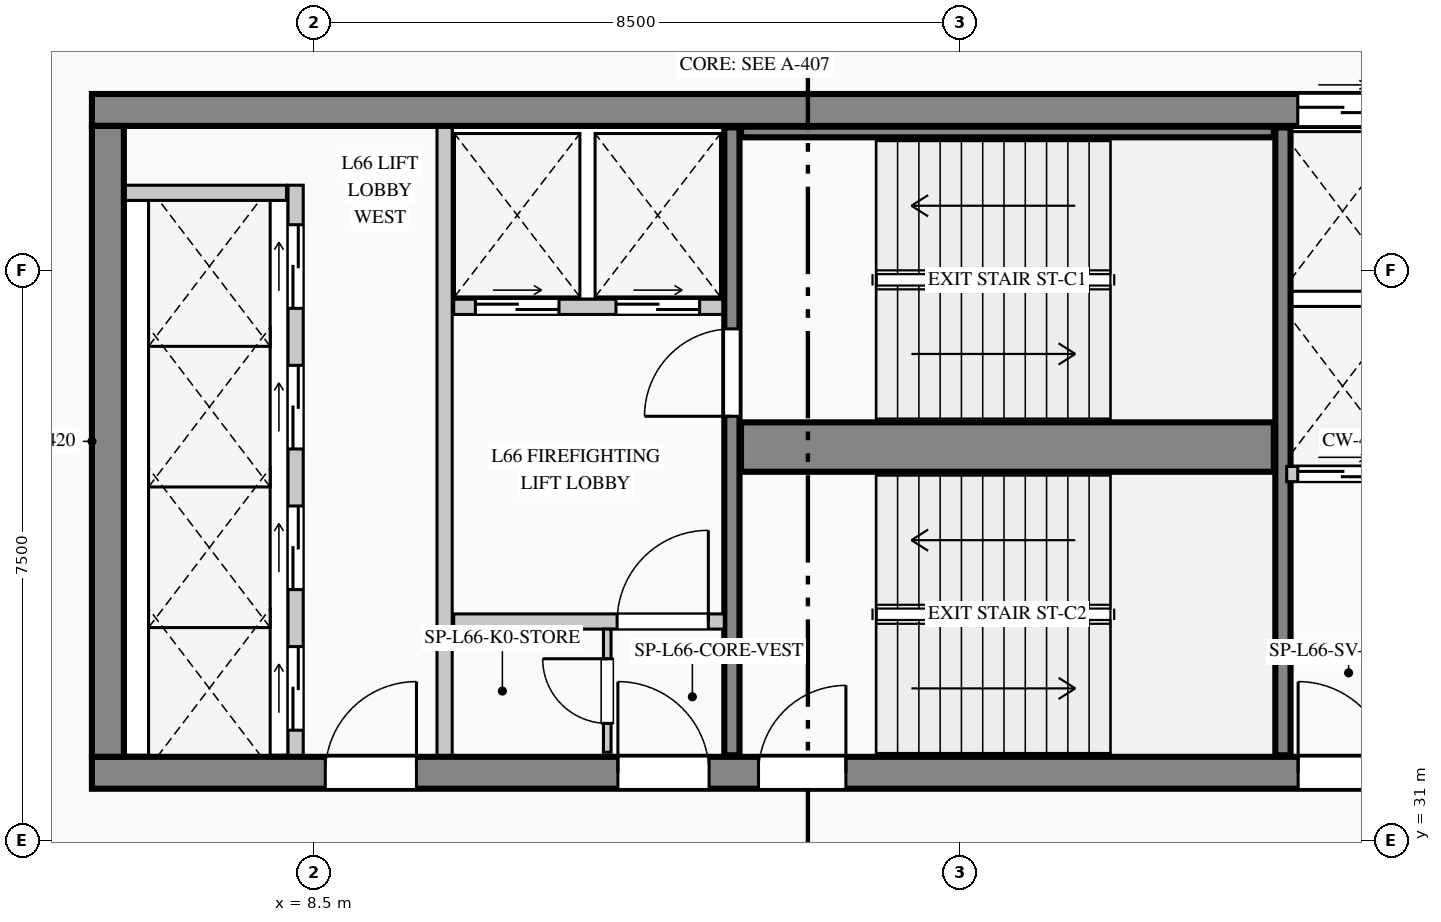
"""IFC4 building model, lengths in metres.
Left out: names, types, materials, properties, quantities, classifications, styles, units other than length and angle.
Written with IfcOpenShell. Run it as: python <this file> out.ifc"""

import sys

from ifc_helpers import new_model, si_unit, direction, frame, frame_2d, origin, place, context, subcontext, project, spatial, rectangle, extrude, element, fill, save


model = new_model("IFC4")
c1 = context("Model", 3, precision=1e-05, world=origin(), true_north=direction((0.0, 1.0)))
c2 = subcontext(c1, "Body", "Model", "MODEL_VIEW")
j1 = project(units=[si_unit("LENGTHUNIT", "METRE"), si_unit("PLANEANGLEUNIT", "RADIAN")], contexts=[c1])
p1 = place(None, origin())
s1 = spatial("IfcSite", under=j1, at=p1, CompositionType="ELEMENT")
p2 = place(p1, origin())
s2 = spatial("IfcBuilding", under=s1, at=p2, CompositionType="ELEMENT")
p3 = place(p2, frame((0.0, 0.0, 276.45)))
s3 = spatial("IfcBuildingStorey", under=s2, at=p3, CompositionType="ELEMENT", Elevation=276.45)
p4 = place(p3, frame((5.58, 40.61, 0.0), z_axis=(0.0, 0.0, 1.0), x_axis=(1.0, 0.0, 0.0)))
e1 = element("IfcWall", 1, at=p4, inside=s3, PredefinedType="SHEAR", context=c2, shape_type="SweptSolid", body=[
    extrude(rectangle(XDim=17.69, YDim=0.42, at=frame_2d((8.845, 0.0))), origin(), (0.0, 0.0, 1.0), 3.95),
])
p5 = place(p4, frame((15.865, 0.0, 0.0)))
e2 = element("IfcOpeningElement", 2, at=p5, cuts=e1, PredefinedType="OPENING", context=c2, shape_type="SweptSolid", body=[
    extrude(rectangle(XDim=1.18, YDim=2.25, at=frame_2d((0.59, 1.125))), frame((0.0, 0.22, 0.0), z_axis=(0.0, -1.0, 0.0), x_axis=(1.0, 0.0, 0.0)), (0.0, 0.0, 1.0), 0.44),
])
p6 = place(p3, frame((5.58, 31.89, 0.0), z_axis=(0.0, 0.0, 1.0), x_axis=(1.0, 0.0, 0.0)))
e3 = element("IfcWall", 3, at=p6, inside=s3, PredefinedType="SHEAR", context=c2, shape_type="SweptSolid", body=[
    extrude(rectangle(XDim=17.69, YDim=0.42, at=frame_2d((8.845, 0.0))), origin(), (0.0, 0.0, 1.0), 3.95),
])
p7 = place(p6, frame((3.07, 0.0, 0.0)))
e4 = element("IfcOpeningElement", 4, at=p7, cuts=e3, PredefinedType="OPENING", context=c2, shape_type="SweptSolid", body=[
    extrude(rectangle(XDim=1.2, YDim=2.2, at=frame_2d((0.6, 1.1))), frame((0.0, 0.22, 0.0), z_axis=(0.0, -1.0, 0.0), x_axis=(1.0, 0.0, 0.0)), (0.0, 0.0, 1.0), 0.44),
])
p8 = place(p6, frame((6.92, 0.0, 0.0)))
e5 = element("IfcOpeningElement", 5, at=p8, cuts=e3, PredefinedType="OPENING", context=c2, shape_type="SweptSolid", body=[
    extrude(rectangle(XDim=1.2, YDim=2.2, at=frame_2d((0.6, 1.1))), frame((0.0, 0.22, 0.0), z_axis=(0.0, -1.0, 0.0), x_axis=(1.0, 0.0, 0.0)), (0.0, 0.0, 1.0), 0.44),
])
p9 = place(p6, frame((8.77, 0.0, 0.0)))
e6 = element("IfcOpeningElement", 6, at=p9, cuts=e3, PredefinedType="OPENING", context=c2, shape_type="SweptSolid", body=[
    extrude(rectangle(XDim=1.15, YDim=2.2, at=frame_2d((0.575, 1.1))), frame((0.0, 0.22, 0.0), z_axis=(0.0, -1.0, 0.0), x_axis=(1.0, 0.0, 0.0)), (0.0, 0.0, 1.0), 0.44),
])
p10 = place(p6, frame((15.87, 0.0, 0.0)))
e7 = element("IfcOpeningElement", 7, at=p10, cuts=e3, PredefinedType="OPENING", context=c2, shape_type="SweptSolid", body=[
    extrude(rectangle(XDim=1.2, YDim=2.2, at=frame_2d((0.6, 1.1))), frame((0.0, 0.22, 0.0), z_axis=(0.0, -1.0, 0.0), x_axis=(1.0, 0.0, 0.0)), (0.0, 0.0, 1.0), 0.44),
])
p11 = place(p3, frame((5.79, 32.1, 0.0), z_axis=(0.0, 0.0, 1.0), x_axis=(0.0, 1.0, 0.0)))
e8 = element("IfcWall", 8, at=p11, inside=s3, PredefinedType="SHEAR", context=c2, shape_type="SweptSolid", body=[
    extrude(rectangle(XDim=8.3, YDim=0.42, at=frame_2d((4.15, 0.0))), origin(), (0.0, 0.0, 1.0), 3.95),
])
p12 = place(p3, frame((14.0, 32.12, 0.0), z_axis=(0.0, 0.0, 1.0), x_axis=(0.0, 1.0, 0.0)))
e9 = element("IfcWall", 9, at=p12, inside=s3, PredefinedType="SHEAR", context=c2, shape_type="SweptSolid", body=[
    extrude(rectangle(XDim=8.26, YDim=0.2, at=frame_2d((4.13, 0.0))), origin(), (0.0, 0.0, 1.0), 3.95),
])
p13 = place(p12, frame((4.46, 0.0, 0.0)))
e10 = element("IfcOpeningElement", 10, at=p13, cuts=e9, PredefinedType="OPENING", context=c2, shape_type="SweptSolid", body=[
    extrude(rectangle(XDim=1.15, YDim=2.2, at=frame_2d((0.575, 1.1))), frame((0.0, 0.11, 0.0), z_axis=(0.0, -1.0, 0.0), x_axis=(1.0, 0.0, 0.0)), (0.0, 0.0, 1.0), 0.22),
])
p14 = place(p3, frame((14.12, 36.175, 0.0), z_axis=(0.0, 0.0, 1.0), x_axis=(1.0, 0.0, 0.0)))
e11 = element("IfcWall", 11, at=p14, inside=s3, PredefinedType="SHEAR", context=c2, shape_type="SweptSolid", body=[
    extrude(rectangle(XDim=7.01, YDim=0.65, at=frame_2d((3.505, 0.0))), origin(), (0.0, 0.0, 1.0), 3.95),
])
p15 = place(p3, frame((21.25, 32.12, 0.0), z_axis=(0.0, 0.0, 1.0), x_axis=(0.0, 1.0, 0.0)))
e12 = element("IfcWall", 12, at=p15, inside=s3, PredefinedType="SHEAR", context=c2, shape_type="SweptSolid", body=[
    extrude(rectangle(XDim=8.26, YDim=0.2, at=frame_2d((4.13, 0.0))), origin(), (0.0, 0.0, 1.0), 3.95),
])
p16 = place(p3, frame((14.12, 40.32, 0.0), z_axis=(0.0, 0.0, 1.0), x_axis=(1.0, 0.0, 0.0)))
e13 = element("IfcWall", 13, at=p16, inside=s3, PredefinedType="SHEAR", context=c2, shape_type="SweptSolid", body=[
    extrude(rectangle(XDim=7.01, YDim=0.14, at=frame_2d((3.505, 0.0))), origin(), (0.0, 0.0, 1.0), 3.95),
])
p17 = place(p3, frame((5.6, 4.32, 0.0), z_axis=(0.0, 0.0, 1.0), x_axis=(-0.075839920993, 0.997120006009, 0.0)))
e14 = element("IfcWall", 14, at=p17, inside=s3, PredefinedType="STANDARD", context=c2, shape_type="SweptSolid", body=[
    extrude(rectangle(XDim=37.468, YDim=0.24, at=frame_2d((18.734, 0.0))), origin(), (0.0, 0.0, 1.0), 3.7),
])
p18 = place(p17, frame((12.663, 0.0, 0.9)))
e15 = element("IfcOpeningElement", 15, at=p18, cuts=e14, PredefinedType="OPENING", context=c2, shape_type="SweptSolid", body=[
    extrude(rectangle(XDim=1.65, YDim=1.95, at=frame_2d((0.825, 0.975))), frame((0.0, 0.13, 0.0), z_axis=(0.0, -1.0, 0.0), x_axis=(1.0, 0.0, 0.0)), (0.0, 0.0, 1.0), 0.26),
])
p19 = place(p3, frame((8.26, 32.12, 0.0), z_axis=(0.0, 0.0, 1.0), x_axis=(0.0, 1.0, 0.0)))
e16 = element("IfcWall", 16, at=p19, inside=s3, PredefinedType="PARTITIONING", context=c2, shape_type="SweptSolid", body=[
    extrude(rectangle(XDim=7.5, YDim=0.2, at=frame_2d((3.75, 0.0))), origin(), (0.0, 0.0, 1.0), 3.7),
])
p20 = place(p19, frame((0.33, 0.0, 0.0)))
e17 = element("IfcOpeningElement", 17, at=p20, cuts=e16, PredefinedType="OPENING", context=c2, shape_type="SweptSolid", body=[
    extrude(rectangle(XDim=1.1, YDim=2.2, at=frame_2d((0.55, 1.1))), frame((0.0, 0.11, 0.0), z_axis=(0.0, -1.0, 0.0), x_axis=(1.0, 0.0, 0.0)), (0.0, 0.0, 1.0), 0.22),
])
p21 = place(p19, frame((2.18, 0.0, 0.0)))
e18 = element("IfcOpeningElement", 18, at=p21, cuts=e16, PredefinedType="OPENING", context=c2, shape_type="SweptSolid", body=[
    extrude(rectangle(XDim=1.1, YDim=2.2, at=frame_2d((0.55, 1.1))), frame((0.0, 0.11, 0.0), z_axis=(0.0, -1.0, 0.0), x_axis=(1.0, 0.0, 0.0)), (0.0, 0.0, 1.0), 0.22),
])
p22 = place(p19, frame((4.03, 0.0, 0.0)))
e19 = element("IfcOpeningElement", 19, at=p22, cuts=e16, PredefinedType="OPENING", context=c2, shape_type="SweptSolid", body=[
    extrude(rectangle(XDim=1.1, YDim=2.2, at=frame_2d((0.55, 1.1))), frame((0.0, 0.11, 0.0), z_axis=(0.0, -1.0, 0.0), x_axis=(1.0, 0.0, 0.0)), (0.0, 0.0, 1.0), 0.22),
])
p23 = place(p19, frame((5.88, 0.0, 0.0)))
e20 = element("IfcOpeningElement", 20, at=p23, cuts=e16, PredefinedType="OPENING", context=c2, shape_type="SweptSolid", body=[
    extrude(rectangle(XDim=1.1, YDim=2.2, at=frame_2d((0.55, 1.1))), frame((0.0, 0.11, 0.0), z_axis=(0.0, -1.0, 0.0), x_axis=(1.0, 0.0, 0.0)), (0.0, 0.0, 1.0), 0.22),
])
p24 = place(p3, frame((6.02, 39.52, 0.0), z_axis=(0.0, 0.0, 1.0), x_axis=(1.0, 0.0, 0.0)))
e21 = element("IfcWall", 21, at=p24, inside=s3, PredefinedType="PARTITIONING", context=c2, shape_type="SweptSolid", body=[
    extrude(rectangle(XDim=2.12, YDim=0.2, at=frame_2d((1.06, 0.0))), origin(), (0.0, 0.0, 1.0), 3.7),
])
p25 = place(p3, frame((10.22, 32.12, 0.0), z_axis=(0.0, 0.0, 1.0), x_axis=(0.0, 1.0, 0.0)))
e22 = element("IfcWall", 22, at=p25, inside=s3, PredefinedType="PARTITIONING", context=c2, shape_type="SweptSolid", body=[
    extrude(rectangle(XDim=8.26, YDim=0.2, at=frame_2d((4.13, 0.0))), origin(), (0.0, 0.0, 1.0), 3.7),
])
p26 = place(p3, frame((10.34, 38.02, 0.0), z_axis=(0.0, 0.0, 1.0), x_axis=(1.0, 0.0, 0.0)))
e23 = element("IfcWall", 23, at=p26, inside=s3, PredefinedType="PARTITIONING", context=c2, shape_type="SweptSolid", body=[
    extrude(rectangle(XDim=3.54, YDim=0.2, at=frame_2d((1.77, 0.0))), origin(), (0.0, 0.0, 1.0), 3.7),
])
p27 = place(p26, frame((0.285, 0.0, 0.0)))
e24 = element("IfcOpeningElement", 24, at=p27, cuts=e23, PredefinedType="OPENING", context=c2, shape_type="SweptSolid", body=[
    extrude(rectangle(XDim=1.1, YDim=2.2, at=frame_2d((0.55, 1.1))), frame((0.0, 0.11, 0.0), z_axis=(0.0, -1.0, 0.0), x_axis=(1.0, 0.0, 0.0)), (0.0, 0.0, 1.0), 0.22),
])
p28 = place(p26, frame((2.135, 0.0, 0.0)))
e25 = element("IfcOpeningElement", 25, at=p28, cuts=e23, PredefinedType="OPENING", context=c2, shape_type="SweptSolid", body=[
    extrude(rectangle(XDim=1.1, YDim=2.2, at=frame_2d((0.55, 1.1))), frame((0.0, 0.11, 0.0), z_axis=(0.0, -1.0, 0.0), x_axis=(1.0, 0.0, 0.0)), (0.0, 0.0, 1.0), 0.22),
])
p29 = place(p3, frame((10.34, 33.88, 0.0), z_axis=(0.0, 0.0, 1.0), x_axis=(1.0, 0.0, 0.0)))
e26 = element("IfcWall", 26, at=p29, inside=s3, PredefinedType="PARTITIONING", context=c2, shape_type="SweptSolid", body=[
    extrude(rectangle(XDim=3.56, YDim=0.2, at=frame_2d((1.78, 0.0))), origin(), (0.0, 0.0, 1.0), 3.7),
])
p30 = place(p29, frame((2.15, 0.0, 0.0)))
e27 = element("IfcOpeningElement", 27, at=p30, cuts=e26, PredefinedType="OPENING", context=c2, shape_type="SweptSolid", body=[
    extrude(rectangle(XDim=1.2, YDim=2.2, at=frame_2d((0.6, 1.1))), frame((0.0, 0.11, 0.0), z_axis=(0.0, -1.0, 0.0), x_axis=(1.0, 0.0, 0.0)), (0.0, 0.0, 1.0), 0.22),
])
p31 = place(p3, frame((12.36, 32.16, 0.0), z_axis=(0.0, 0.0, 1.0), x_axis=(0.0, 1.0, 0.0)))
e28 = element("IfcWall", 28, at=p31, inside=s3, PredefinedType="PARTITIONING", context=c2, shape_type="SweptSolid", body=[
    extrude(rectangle(XDim=1.62, YDim=0.1, at=frame_2d((0.81, 0.0))), origin(), (0.0, 0.0, 1.0), 3.7),
])
p32 = place(p31, frame((0.38, 0.0, 0.0)))
e29 = element("IfcOpeningElement", 29, at=p32, cuts=e28, PredefinedType="OPENING", context=c2, shape_type="SweptSolid", body=[
    extrude(rectangle(XDim=0.85, YDim=2.1, at=frame_2d((0.425, 1.05))), frame((0.0, 0.06, 0.0), z_axis=(0.0, -1.0, 0.0), x_axis=(1.0, 0.0, 0.0)), (0.0, 0.0, 1.0), 0.12),
])
p33 = place(p3, frame((21.3, 35.82, 0.0), z_axis=(0.0, 0.0, 1.0), x_axis=(1.0, 0.0, 0.0)))
e30 = element("IfcWall", 30, at=p33, inside=s3, PredefinedType="PARTITIONING", context=c2, shape_type="SweptSolid", body=[
    extrude(rectangle(XDim=1.5, YDim=0.2, at=frame_2d((0.75, 0.0))), origin(), (0.0, 0.0, 1.0), 3.7),
])
p34 = place(p33, frame((0.145, 0.0, 0.0)))
e31 = element("IfcOpeningElement", 31, at=p34, cuts=e30, PredefinedType="OPENING", context=c2, shape_type="SweptSolid", body=[
    extrude(rectangle(XDim=1.18, YDim=2.25, at=frame_2d((0.59, 1.125))), frame((0.0, 0.11, 0.0), z_axis=(0.0, -1.0, 0.0), x_axis=(1.0, 0.0, 0.0)), (0.0, 0.0, 1.0), 0.22),
])
p35 = place(p7, origin())
e32 = element("IfcDoor", 32, at=p35, inside=s3, OperationType="SINGLE_SWING_RIGHT", PredefinedType="DOOR", context=c2, shape_type="SweptSolid", body=[
    extrude(rectangle(XDim=1.2, YDim=2.2, at=frame_2d((0.6, 1.1))), frame((0.0, 0.025, 0.0), z_axis=(0.0, -1.0, 0.0), x_axis=(1.0, 0.0, 0.0)), (0.0, 0.0, 1.0), 0.05),
])
fill(e4, e32)
p36 = place(p8, origin())
e33 = element("IfcDoor", 33, at=p36, inside=s3, OperationType="SINGLE_SWING_LEFT", PredefinedType="DOOR", context=c2, shape_type="SweptSolid", body=[
    extrude(rectangle(XDim=1.2, YDim=2.2, at=frame_2d((0.6, 1.1))), frame((0.0, 0.025, 0.0), z_axis=(0.0, -1.0, 0.0), x_axis=(1.0, 0.0, 0.0)), (0.0, 0.0, 1.0), 0.05),
])
fill(e5, e33)
p37 = place(p9, origin())
e34 = element("IfcDoor", 34, at=p37, inside=s3, OperationType="SINGLE_SWING_RIGHT", PredefinedType="DOOR", context=c2, shape_type="SweptSolid", body=[
    extrude(rectangle(XDim=1.15, YDim=2.2, at=frame_2d((0.575, 1.1))), frame((0.0, 0.025, 0.0), z_axis=(0.0, -1.0, 0.0), x_axis=(1.0, 0.0, 0.0)), (0.0, 0.0, 1.0), 0.05),
])
fill(e6, e34)
p38 = place(p10, origin())
e35 = element("IfcDoor", 35, at=p38, inside=s3, OperationType="SINGLE_SWING_LEFT", PredefinedType="DOOR", context=c2, shape_type="SweptSolid", body=[
    extrude(rectangle(XDim=1.2, YDim=2.2, at=frame_2d((0.6, 1.1))), frame((0.0, 0.025, 0.0), z_axis=(0.0, -1.0, 0.0), x_axis=(1.0, 0.0, 0.0)), (0.0, 0.0, 1.0), 0.05),
])
fill(e7, e35)
p39 = place(p30, origin())
e36 = element("IfcDoor", 36, at=p39, inside=s3, OperationType="SINGLE_SWING_RIGHT", PredefinedType="DOOR", context=c2, shape_type="SweptSolid", body=[
    extrude(rectangle(XDim=1.2, YDim=2.2, at=frame_2d((0.6, 1.1))), frame((0.0, 0.025, 0.0), z_axis=(0.0, -1.0, 0.0), x_axis=(1.0, 0.0, 0.0)), (0.0, 0.0, 1.0), 0.05),
])
fill(e27, e36)
p40 = place(p32, origin())
e37 = element("IfcDoor", 37, at=p40, inside=s3, OperationType="SINGLE_SWING_RIGHT", PredefinedType="DOOR", context=c2, shape_type="SweptSolid", body=[
    extrude(rectangle(XDim=0.85, YDim=2.1, at=frame_2d((0.425, 1.05))), frame((0.0, 0.025, 0.0), z_axis=(0.0, -1.0, 0.0), x_axis=(1.0, 0.0, 0.0)), (0.0, 0.0, 1.0), 0.05),
])
fill(e29, e37)
p41 = place(p13, origin())
e38 = element("IfcDoor", 38, at=p41, inside=s3, OperationType="SINGLE_SWING_LEFT", PredefinedType="DOOR", context=c2, shape_type="SweptSolid", body=[
    extrude(rectangle(XDim=1.15, YDim=2.2, at=frame_2d((0.575, 1.1))), frame((0.0, 0.025, 0.0), z_axis=(0.0, -1.0, 0.0), x_axis=(1.0, 0.0, 0.0)), (0.0, 0.0, 1.0), 0.05),
])
fill(e10, e38)
p42 = place(p20, origin())
e39 = element("IfcDoor", 39, at=p42, inside=s3, OperationType="DOUBLE_DOOR_SLIDING", PredefinedType="DOOR", context=c2, shape_type="SweptSolid", body=[
    extrude(rectangle(XDim=1.1, YDim=2.2, at=frame_2d((0.55, 1.1))), frame((0.0, 0.025, 0.0), z_axis=(0.0, -1.0, 0.0), x_axis=(1.0, 0.0, 0.0)), (0.0, 0.0, 1.0), 0.05),
])
fill(e17, e39)
p43 = place(p21, origin())
e40 = element("IfcDoor", 40, at=p43, inside=s3, OperationType="DOUBLE_DOOR_SLIDING", PredefinedType="DOOR", context=c2, shape_type="SweptSolid", body=[
    extrude(rectangle(XDim=1.1, YDim=2.2, at=frame_2d((0.55, 1.1))), frame((0.0, 0.025, 0.0), z_axis=(0.0, -1.0, 0.0), x_axis=(1.0, 0.0, 0.0)), (0.0, 0.0, 1.0), 0.05),
])
fill(e18, e40)
p44 = place(p22, origin())
e41 = element("IfcDoor", 41, at=p44, inside=s3, OperationType="DOUBLE_DOOR_SLIDING", PredefinedType="DOOR", context=c2, shape_type="SweptSolid", body=[
    extrude(rectangle(XDim=1.1, YDim=2.2, at=frame_2d((0.55, 1.1))), frame((0.0, 0.025, 0.0), z_axis=(0.0, -1.0, 0.0), x_axis=(1.0, 0.0, 0.0)), (0.0, 0.0, 1.0), 0.05),
])
fill(e19, e41)
p45 = place(p23, origin())
e42 = element("IfcDoor", 42, at=p45, inside=s3, OperationType="DOUBLE_DOOR_SLIDING", PredefinedType="DOOR", context=c2, shape_type="SweptSolid", body=[
    extrude(rectangle(XDim=1.1, YDim=2.2, at=frame_2d((0.55, 1.1))), frame((0.0, 0.025, 0.0), z_axis=(0.0, -1.0, 0.0), x_axis=(1.0, 0.0, 0.0)), (0.0, 0.0, 1.0), 0.05),
])
fill(e20, e42)
p46 = place(p27, origin())
e43 = element("IfcDoor", 43, at=p46, inside=s3, OperationType="DOUBLE_DOOR_SLIDING", PredefinedType="DOOR", context=c2, shape_type="SweptSolid", body=[
    extrude(rectangle(XDim=1.1, YDim=2.2, at=frame_2d((0.55, 1.1))), frame((0.0, 0.025, 0.0), z_axis=(0.0, -1.0, 0.0), x_axis=(1.0, 0.0, 0.0)), (0.0, 0.0, 1.0), 0.05),
])
fill(e24, e43)
p47 = place(p28, origin())
e44 = element("IfcDoor", 44, at=p47, inside=s3, OperationType="DOUBLE_DOOR_SLIDING", PredefinedType="DOOR", context=c2, shape_type="SweptSolid", body=[
    extrude(rectangle(XDim=1.1, YDim=2.2, at=frame_2d((0.55, 1.1))), frame((0.0, 0.025, 0.0), z_axis=(0.0, -1.0, 0.0), x_axis=(1.0, 0.0, 0.0)), (0.0, 0.0, 1.0), 0.05),
])
fill(e25, e44)
p48 = place(p5, origin())
e45 = element("IfcDoor", 45, at=p48, inside=s3, OperationType="DOUBLE_DOOR_SLIDING", PredefinedType="DOOR", context=c2, shape_type="SweptSolid", body=[
    extrude(rectangle(XDim=1.18, YDim=2.25, at=frame_2d((0.59, 1.125))), frame((0.0, 0.025, 0.0), z_axis=(0.0, -1.0, 0.0), x_axis=(1.0, 0.0, 0.0)), (0.0, 0.0, 1.0), 0.05),
])
fill(e2, e45)
p49 = place(p34, origin())
e46 = element("IfcDoor", 46, at=p49, inside=s3, OperationType="DOUBLE_DOOR_SLIDING", PredefinedType="DOOR", context=c2, shape_type="SweptSolid", body=[
    extrude(rectangle(XDim=1.18, YDim=2.25, at=frame_2d((0.59, 1.125))), frame((0.0, 0.025, 0.0), z_axis=(0.0, -1.0, 0.0), x_axis=(1.0, 0.0, 0.0)), (0.0, 0.0, 1.0), 0.05),
])
fill(e31, e46)
save(model, sys.argv[1])
